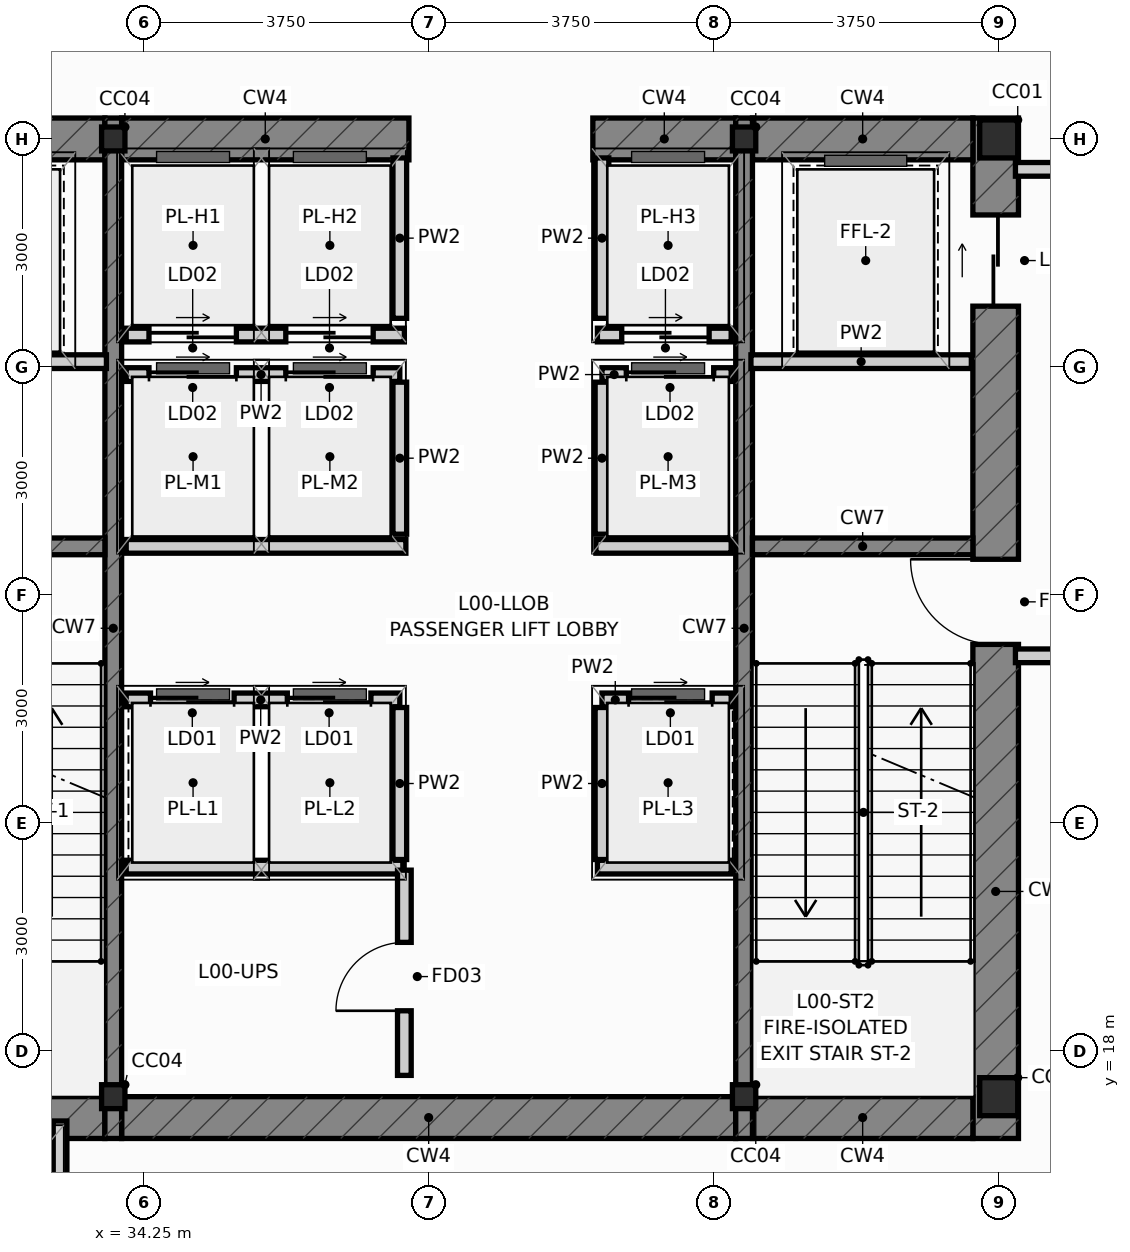
"""IFC4 building model, lengths in metres.
Left out: names, types, materials, properties, quantities, classifications, styles, units other than length and angle.
Written with IfcOpenShell. Run it as: python <this file> out.ifc"""

import sys

from ifc_helpers import new_model, si_unit, direction, frame, frame_2d, origin, origin_2d, place, context, subcontext, project, spatial, rectangle, i_section, extrude, source, transform, mapped, element, fill, save


model = new_model("IFC4")
c1 = context("Model", 3, precision=1e-05, world=origin(), true_north=direction((0.0, 1.0)))
c2 = subcontext(c1, "Body", "Model", "MODEL_VIEW")
j1 = project(units=[si_unit("LENGTHUNIT", "METRE"), si_unit("PLANEANGLEUNIT", "RADIAN")], contexts=[c1])
p1 = place(None, origin())
s1 = spatial("IfcSite", under=j1, at=p1, CompositionType="ELEMENT")
p2 = place(p1, origin())
s2 = spatial("IfcBuilding", under=s1, at=p2, CompositionType="ELEMENT")
p3 = place(p2, origin())
s3 = spatial("IfcBuildingStorey", under=s2, at=p3, CompositionType="ELEMENT", Elevation=0.0)
m1 = source(origin(), c2, "Body", "SweptSolid", [
    extrude(i_section(OverallWidth=0.5, OverallDepth=0.5, WebThickness=0.028, FlangeThickness=0.04, at=origin_2d()), origin(), (0.0, 0.0, 1.0), 5.4),
])
for number, where, z_axis, x_axis in (
    (1, (45.5, 17.4, 0.0), (0.0, 0.0, 1.0), (1.0, 0.0, 0.0)),
    (2, (45.5, 30.0, 0.0), (0.0, 0.0, 1.0), (1.0, 0.0, 0.0)),
):
    element("IfcColumn", number, at=place(p3, frame(where, z_axis=z_axis, x_axis=x_axis)), inside=s3, PredefinedType="COLUMN", context=c2, shape_type="MappedRepresentation", body=[
        mapped(m1, transform((0.0, 0.0, 0.0), scale=1.0)),
    ])
m2 = source(origin(), c2, "Body", "SweptSolid", [
    extrude(i_section(OverallWidth=0.307, OverallDepth=0.315, WebThickness=0.012, FlangeThickness=0.019, at=origin_2d()), origin(), (0.0, 0.0, 1.0), 5.4),
])
for number, where, z_axis, x_axis in (
    (3, (33.85, 17.4, 0.0), (0.0, 0.0, 1.0), (1.0, 0.0, 0.0)),
    (4, (42.15, 17.4, 0.0), (0.0, 0.0, 1.0), (1.0, 0.0, 0.0)),
    (5, (33.85, 30.0, 0.0), (0.0, 0.0, 1.0), (1.0, 0.0, 0.0)),
    (6, (42.15, 30.0, 0.0), (0.0, 0.0, 1.0), (1.0, 0.0, 0.0)),
):
    element("IfcColumn", number, at=place(p3, frame(where, z_axis=z_axis, x_axis=x_axis)), inside=s3, PredefinedType="COLUMN", context=c2, shape_type="MappedRepresentation", body=[
        mapped(m2, transform((0.0, 0.0, 0.0), scale=1.0)),
    ])
p4 = place(p3, frame((45.46, 16.85, 0.0), z_axis=(0.0, 0.0, 1.0), x_axis=(0.0, 1.0, 0.0)))
e7 = element("IfcWall", 7, at=p4, inside=s3, PredefinedType="SHEAR", context=c2, shape_type="SweptSolid", body=[
    extrude(rectangle(XDim=13.425, YDim=0.6, at=frame_2d((6.712, 0.0))), origin(), (0.0, 0.0, 1.0), 5.4),
])
p5 = place(p4, frame((6.5, 0.0, 0.0)))
e8 = element("IfcOpeningElement", 8, at=p5, cuts=e7, PredefinedType="OPENING", context=c2, shape_type="SweptSolid", body=[
    extrude(rectangle(XDim=1.12, YDim=2.15, at=frame_2d((0.56, 1.075))), frame((0.0, 0.312, 0.0), z_axis=(0.0, -1.0, 0.0), x_axis=(1.0, 0.0, 0.0)), (0.0, 0.0, 1.0), 0.624),
])
p6 = place(p4, frame((10.95, 0.0, 0.0)))
e9 = element("IfcOpeningElement", 9, at=p6, cuts=e7, PredefinedType="OPENING", context=c2, shape_type="SweptSolid", body=[
    extrude(rectangle(XDim=1.2, YDim=2.2, at=frame_2d((0.6, 1.1))), frame((0.0, 0.312, 0.0), z_axis=(0.0, -1.0, 0.0), x_axis=(1.0, 0.0, 0.0)), (0.0, 0.0, 1.0), 0.624),
])
p7 = place(p3, frame((30.84, 17.125, 0.0), z_axis=(0.0, 0.0, 1.0), x_axis=(1.0, 0.0, 0.0)))
e10 = element("IfcWall", 10, at=p7, inside=s3, PredefinedType="SHEAR", context=c2, shape_type="SweptSolid", body=[
    extrude(rectangle(XDim=2.9, YDim=0.55, at=frame_2d((1.45, 0.0))), origin(), (0.0, 0.0, 1.0), 5.4),
])
p8 = place(p3, frame((33.96, 17.125, 0.0), z_axis=(0.0, 0.0, 1.0), x_axis=(1.0, 0.0, 0.0)))
e11 = element("IfcWall", 11, at=p8, inside=s3, PredefinedType="SHEAR", context=c2, shape_type="SweptSolid", body=[
    extrude(rectangle(XDim=8.08, YDim=0.55, at=frame_2d((4.04, 0.0))), origin(), (0.0, 0.0, 1.0), 5.4),
])
for number, where, z_axis, x_axis in (
    (12, (42.26, 17.125, 0.0), (0.0, 0.0, 1.0), (1.0, 0.0, 0.0)),
    (13, (30.84, 30.0, 0.0), (0.0, 0.0, 1.0), (1.0, 0.0, 0.0)),
):
    element("IfcWall", number, at=place(p3, frame(where, z_axis=z_axis, x_axis=x_axis)), inside=s3, PredefinedType="SHEAR", context=c2, shape_type="SweptSolid", body=[
        extrude(rectangle(XDim=2.9, YDim=0.55, at=frame_2d((1.45, 0.0))), origin(), (0.0, 0.0, 1.0), 5.4),
    ])
p9 = place(p3, frame((33.96, 30.0, 0.0), z_axis=(0.0, 0.0, 1.0), x_axis=(1.0, 0.0, 0.0)))
e14 = element("IfcWall", 14, at=p9, inside=s3, PredefinedType="SHEAR", context=c2, shape_type="SweptSolid", body=[
    extrude(rectangle(XDim=3.78, YDim=0.55, at=frame_2d((1.89, 0.0))), origin(), (0.0, 0.0, 1.0), 5.4),
])
p10 = place(p3, frame((40.16, 30.0, 0.0), z_axis=(0.0, 0.0, 1.0), x_axis=(1.0, 0.0, 0.0)))
e15 = element("IfcWall", 15, at=p10, inside=s3, PredefinedType="SHEAR", context=c2, shape_type="SweptSolid", body=[
    extrude(rectangle(XDim=1.88, YDim=0.55, at=frame_2d((0.94, 0.0))), origin(), (0.0, 0.0, 1.0), 5.4),
])
p11 = place(p3, frame((42.26, 30.0, 0.0), z_axis=(0.0, 0.0, 1.0), x_axis=(1.0, 0.0, 0.0)))
e16 = element("IfcWall", 16, at=p11, inside=s3, PredefinedType="SHEAR", context=c2, shape_type="SweptSolid", body=[
    extrude(rectangle(XDim=2.9, YDim=0.55, at=frame_2d((1.45, 0.0))), origin(), (0.0, 0.0, 1.0), 5.4),
])
for number, where, z_axis, x_axis in (
    (17, (33.85, 16.85, 0.0), (0.0, 0.0, 1.0), (0.0, 1.0, 0.0)),
    (18, (42.15, 16.85, 0.0), (0.0, 0.0, 1.0), (0.0, 1.0, 0.0)),
):
    element("IfcWall", number, at=place(p3, frame(where, z_axis=z_axis, x_axis=x_axis)), inside=s3, PredefinedType="SHEAR", context=c2, shape_type="SweptSolid", body=[
        extrude(rectangle(XDim=13.425, YDim=0.22, at=frame_2d((6.712, 0.0))), origin(), (0.0, 0.0, 1.0), 5.4),
    ])
for number, where, z_axis, x_axis in (
    (19, (30.84, 24.64, 0.0), (0.0, 0.0, 1.0), (1.0, 0.0, 0.0)),
    (20, (42.26, 24.64, 0.0), (0.0, 0.0, 1.0), (1.0, 0.0, 0.0)),
):
    element("IfcWall", number, at=place(p3, frame(where, z_axis=z_axis, x_axis=x_axis)), inside=s3, PredefinedType="SHEAR", context=c2, shape_type="SweptSolid", body=[
        extrude(rectangle(XDim=2.9, YDim=0.22, at=frame_2d((1.45, 0.0))), origin(), (0.0, 0.0, 1.0), 5.4),
    ])
p12 = place(p3, frame((33.15, 14.42, 0.0), z_axis=(0.0, 0.0, 1.0), x_axis=(0.0, 1.0, 0.0)))
e21 = element("IfcWall", 21, at=p12, inside=s3, PredefinedType="PARTITIONING", context=c2, shape_type="SweptSolid", body=[
    extrude(rectangle(XDim=2.66, YDim=0.18, at=frame_2d((1.33, 0.0))), origin(), (0.0, 0.0, 1.0), 5.08),
])
p13 = place(p3, frame((34.02, 22.62, 0.0), z_axis=(0.0, 0.0, 1.0), x_axis=(1.0, 0.0, 0.0)))
e22 = element("IfcWall", 22, at=p13, inside=s3, PredefinedType="PARTITIONING", context=c2, shape_type="SweptSolid", body=[
    extrude(rectangle(XDim=3.6, YDim=0.18, at=frame_2d((1.8, 0.0))), origin(), (0.0, 0.0, 1.0), 5.08),
])
p14 = place(p13, frame((0.32, 0.0, 0.0)))
e23 = element("IfcOpeningElement", 23, at=p14, cuts=e22, PredefinedType="OPENING", context=c2, shape_type="SweptSolid", body=[
    extrude(rectangle(XDim=1.1, YDim=2.2, at=frame_2d((0.55, 1.1))), frame((0.0, 0.102, 0.0), z_axis=(0.0, -1.0, 0.0), x_axis=(1.0, 0.0, 0.0)), (0.0, 0.0, 1.0), 0.204),
])
p15 = place(p13, frame((2.12, 0.0, 0.0)))
e24 = element("IfcOpeningElement", 24, at=p15, cuts=e22, PredefinedType="OPENING", context=c2, shape_type="SweptSolid", body=[
    extrude(rectangle(XDim=1.1, YDim=2.2, at=frame_2d((0.55, 1.1))), frame((0.0, 0.102, 0.0), z_axis=(0.0, -1.0, 0.0), x_axis=(1.0, 0.0, 0.0)), (0.0, 0.0, 1.0), 0.204),
])
p16 = place(p3, frame((40.28, 22.62, 0.0), z_axis=(0.0, 0.0, 1.0), x_axis=(1.0, 0.0, 0.0)))
e25 = element("IfcWall", 25, at=p16, inside=s3, PredefinedType="PARTITIONING", context=c2, shape_type="SweptSolid", body=[
    extrude(rectangle(XDim=1.7, YDim=0.18, at=frame_2d((0.85, 0.0))), origin(), (0.0, 0.0, 1.0), 5.08),
])
p17 = place(p16, frame((0.35, 0.0, 0.0)))
e26 = element("IfcOpeningElement", 26, at=p17, cuts=e25, PredefinedType="OPENING", context=c2, shape_type="SweptSolid", body=[
    extrude(rectangle(XDim=1.1, YDim=2.2, at=frame_2d((0.55, 1.1))), frame((0.0, 0.102, 0.0), z_axis=(0.0, -1.0, 0.0), x_axis=(1.0, 0.0, 0.0)), (0.0, 0.0, 1.0), 0.204),
])
for number, where, z_axis, x_axis in (
    (27, (37.62, 20.52, 0.0), (0.0, 0.0, 1.0), (0.0, 1.0, 0.0)),
    (28, (40.28, 20.52, 0.0), (0.0, 0.0, 1.0), (0.0, 1.0, 0.0)),
):
    element("IfcWall", number, at=place(p3, frame(where, z_axis=z_axis, x_axis=x_axis)), inside=s3, PredefinedType="PARTITIONING", context=c2, shape_type="SweptSolid", body=[
        extrude(rectangle(XDim=2.0, YDim=0.18, at=frame_2d((1.0, 0.0))), origin(), (0.0, 0.0, 1.0), 5.08),
    ])
p18 = place(p3, frame((34.02, 26.9, 0.0), z_axis=(0.0, 0.0, 1.0), x_axis=(1.0, 0.0, 0.0)))
e29 = element("IfcWall", 29, at=p18, inside=s3, PredefinedType="PARTITIONING", context=c2, shape_type="SweptSolid", body=[
    extrude(rectangle(XDim=3.6, YDim=0.18, at=frame_2d((1.8, 0.0))), origin(), (0.0, 0.0, 1.0), 5.08),
])
p19 = place(p18, frame((0.3, 0.0, 0.0)))
e30 = element("IfcOpeningElement", 30, at=p19, cuts=e29, PredefinedType="OPENING", context=c2, shape_type="SweptSolid", body=[
    extrude(rectangle(XDim=1.15, YDim=2.2, at=frame_2d((0.575, 1.1))), frame((0.0, 0.102, 0.0), z_axis=(0.0, -1.0, 0.0), x_axis=(1.0, 0.0, 0.0)), (0.0, 0.0, 1.0), 0.204),
])
p20 = place(p18, frame((2.1, 0.0, 0.0)))
e31 = element("IfcOpeningElement", 31, at=p20, cuts=e29, PredefinedType="OPENING", context=c2, shape_type="SweptSolid", body=[
    extrude(rectangle(XDim=1.15, YDim=2.2, at=frame_2d((0.575, 1.1))), frame((0.0, 0.102, 0.0), z_axis=(0.0, -1.0, 0.0), x_axis=(1.0, 0.0, 0.0)), (0.0, 0.0, 1.0), 0.204),
])
p21 = place(p3, frame((40.28, 26.9, 0.0), z_axis=(0.0, 0.0, 1.0), x_axis=(1.0, 0.0, 0.0)))
e32 = element("IfcWall", 32, at=p21, inside=s3, PredefinedType="PARTITIONING", context=c2, shape_type="SweptSolid", body=[
    extrude(rectangle(XDim=1.7, YDim=0.18, at=frame_2d((0.85, 0.0))), origin(), (0.0, 0.0, 1.0), 5.08),
])
p22 = place(p21, frame((0.32, 0.0, 0.0)))
e33 = element("IfcOpeningElement", 33, at=p22, cuts=e32, PredefinedType="OPENING", context=c2, shape_type="SweptSolid", body=[
    extrude(rectangle(XDim=1.15, YDim=2.2, at=frame_2d((0.575, 1.1))), frame((0.0, 0.102, 0.0), z_axis=(0.0, -1.0, 0.0), x_axis=(1.0, 0.0, 0.0)), (0.0, 0.0, 1.0), 0.204),
])
for number, where, z_axis, x_axis in (
    (34, (37.62, 24.8, 0.0), (0.0, 0.0, 1.0), (0.0, 1.0, 0.0)),
    (35, (40.28, 24.8, 0.0), (0.0, 0.0, 1.0), (0.0, 1.0, 0.0)),
):
    element("IfcWall", number, at=place(p3, frame(where, z_axis=z_axis, x_axis=x_axis)), inside=s3, PredefinedType="PARTITIONING", context=c2, shape_type="SweptSolid", body=[
        extrude(rectangle(XDim=2.0, YDim=0.18, at=frame_2d((1.0, 0.0))), origin(), (0.0, 0.0, 1.0), 5.08),
    ])
p23 = place(p3, frame((34.02, 24.64, 0.0), z_axis=(0.0, 0.0, 1.0), x_axis=(1.0, 0.0, 0.0)))
e36 = element("IfcWall", 36, at=p23, inside=s3, PredefinedType="PARTITIONING", context=c2, shape_type="SweptSolid", body=[
    extrude(rectangle(XDim=3.68, YDim=0.18, at=frame_2d((1.84, 0.0))), origin(), (0.0, 0.0, 1.0), 5.08),
])
p24 = place(p3, frame((40.2, 24.64, 0.0), z_axis=(0.0, 0.0, 1.0), x_axis=(1.0, 0.0, 0.0)))
e37 = element("IfcWall", 37, at=p24, inside=s3, PredefinedType="PARTITIONING", context=c2, shape_type="SweptSolid", body=[
    extrude(rectangle(XDim=1.78, YDim=0.18, at=frame_2d((0.89, 0.0))), origin(), (0.0, 0.0, 1.0), 5.08),
])
p25 = place(p3, frame((34.02, 27.42, 0.0), z_axis=(0.0, 0.0, 1.0), x_axis=(1.0, 0.0, 0.0)))
e38 = element("IfcWall", 38, at=p25, inside=s3, PredefinedType="PARTITIONING", context=c2, shape_type="SweptSolid", body=[
    extrude(rectangle(XDim=3.66, YDim=0.18, at=frame_2d((1.83, 0.0))), origin(), (0.0, 0.0, 1.0), 5.08),
])
p26 = place(p25, frame((0.3, 0.0, 0.0)))
e39 = element("IfcOpeningElement", 39, at=p26, cuts=e38, PredefinedType="OPENING", context=c2, shape_type="SweptSolid", body=[
    extrude(rectangle(XDim=1.15, YDim=2.2, at=frame_2d((0.575, 1.1))), frame((0.0, 0.102, 0.0), z_axis=(0.0, -1.0, 0.0), x_axis=(1.0, 0.0, 0.0)), (0.0, 0.0, 1.0), 0.204),
])
p27 = place(p25, frame((2.1, 0.0, 0.0)))
e40 = element("IfcOpeningElement", 40, at=p27, cuts=e38, PredefinedType="OPENING", context=c2, shape_type="SweptSolid", body=[
    extrude(rectangle(XDim=1.15, YDim=2.2, at=frame_2d((0.575, 1.1))), frame((0.0, 0.102, 0.0), z_axis=(0.0, -1.0, 0.0), x_axis=(1.0, 0.0, 0.0)), (0.0, 0.0, 1.0), 0.204),
])
p28 = place(p3, frame((40.22, 27.42, 0.0), z_axis=(0.0, 0.0, 1.0), x_axis=(1.0, 0.0, 0.0)))
e41 = element("IfcWall", 41, at=p28, inside=s3, PredefinedType="PARTITIONING", context=c2, shape_type="SweptSolid", body=[
    extrude(rectangle(XDim=1.76, YDim=0.18, at=frame_2d((0.88, 0.0))), origin(), (0.0, 0.0, 1.0), 5.08),
])
p29 = place(p28, frame((0.32, 0.0, 0.0)))
e42 = element("IfcOpeningElement", 42, at=p29, cuts=e41, PredefinedType="OPENING", context=c2, shape_type="SweptSolid", body=[
    extrude(rectangle(XDim=1.15, YDim=2.2, at=frame_2d((0.575, 1.1))), frame((0.0, 0.102, 0.0), z_axis=(0.0, -1.0, 0.0), x_axis=(1.0, 0.0, 0.0)), (0.0, 0.0, 1.0), 0.204),
])
for number, where, z_axis, x_axis in (
    (43, (37.62, 27.64, 0.0), (0.0, 0.0, 1.0), (0.0, 1.0, 0.0)),
    (44, (40.28, 27.64, 0.0), (0.0, 0.0, 1.0), (0.0, 1.0, 0.0)),
):
    element("IfcWall", number, at=place(p3, frame(where, z_axis=z_axis, x_axis=x_axis)), inside=s3, PredefinedType="PARTITIONING", context=c2, shape_type="SweptSolid", body=[
        extrude(rectangle(XDim=2.11, YDim=0.18, at=frame_2d((1.055, 0.0))), origin(), (0.0, 0.0, 1.0), 5.08),
    ])
p30 = place(p3, frame((45.72, 23.2, 0.0), z_axis=(0.0, 0.0, 1.0), x_axis=(1.0, 0.0, 0.0)))
e45 = element("IfcWall", 45, at=p30, inside=s3, PredefinedType="PARTITIONING", context=c2, shape_type="SweptSolid", body=[
    extrude(rectangle(XDim=2.76, YDim=0.18, at=frame_2d((1.38, 0.0))), origin(), (0.0, 0.0, 1.0), 5.08),
])
p31 = place(p3, frame((45.72, 29.6, 0.0), z_axis=(0.0, 0.0, 1.0), x_axis=(1.0, 0.0, 0.0)))
e46 = element("IfcWall", 46, at=p31, inside=s3, PredefinedType="PARTITIONING", context=c2, shape_type="SweptSolid", body=[
    extrude(rectangle(XDim=2.76, YDim=0.18, at=frame_2d((1.38, 0.0))), origin(), (0.0, 0.0, 1.0), 4.453),
])
for number, where, z_axis, x_axis in (
    (47, (30.86, 27.07, 0.0), (0.0, 0.0, 1.0), (1.0, 0.0, 0.0)),
    (48, (42.24, 27.07, 0.0), (0.0, 0.0, 1.0), (1.0, 0.0, 0.0)),
):
    element("IfcWall", number, at=place(p3, frame(where, z_axis=z_axis, x_axis=x_axis)), inside=s3, PredefinedType="PARTITIONING", context=c2, shape_type="SweptSolid", body=[
        extrude(rectangle(XDim=2.9, YDim=0.18, at=frame_2d((1.45, 0.0))), origin(), (0.0, 0.0, 1.0), 5.08),
    ])
p32 = place(p3, frame((34.02, 20.42, 0.0), z_axis=(0.0, 0.0, 1.0), x_axis=(1.0, 0.0, 0.0)))
e49 = element("IfcWall", 49, at=p32, inside=s3, PredefinedType="PARTITIONING", context=c2, shape_type="SweptSolid", body=[
    extrude(rectangle(XDim=3.64, YDim=0.18, at=frame_2d((1.82, 0.0))), origin(), (0.0, 0.0, 1.0), 5.08),
])
p33 = place(p3, frame((40.22, 20.42, 0.0), z_axis=(0.0, 0.0, 1.0), x_axis=(1.0, 0.0, 0.0)))
e50 = element("IfcWall", 50, at=p33, inside=s3, PredefinedType="PARTITIONING", context=c2, shape_type="SweptSolid", body=[
    extrude(rectangle(XDim=1.76, YDim=0.18, at=frame_2d((0.88, 0.0))), origin(), (0.0, 0.0, 1.0), 5.08),
])
p34 = place(p3, frame((37.68, 17.68, 0.0), z_axis=(0.0, 0.0, 1.0), x_axis=(0.0, 1.0, 0.0)))
e51 = element("IfcWall", 51, at=p34, inside=s3, PredefinedType="PARTITIONING", context=c2, shape_type="SweptSolid", body=[
    extrude(rectangle(XDim=2.7, YDim=0.18, at=frame_2d((1.35, 0.0))), origin(), (0.0, 0.0, 1.0), 5.08),
])
p35 = place(p34, frame((0.85, 0.0, 0.0)))
e52 = element("IfcOpeningElement", 52, at=p35, cuts=e51, PredefinedType="OPENING", context=c2, shape_type="SweptSolid", body=[
    extrude(rectangle(XDim=0.9, YDim=2.1, at=frame_2d((0.45, 1.05))), frame((0.0, 0.102, 0.0), z_axis=(0.0, -1.0, 0.0), x_axis=(1.0, 0.0, 0.0)), (0.0, 0.0, 1.0), 0.204),
])
p36 = place(p5, origin())
e53 = element("IfcDoor", 53, at=p36, inside=s3, OperationType="SINGLE_SWING_RIGHT", PredefinedType="DOOR", context=c2, shape_type="SweptSolid", body=[
    extrude(rectangle(XDim=1.12, YDim=2.15, at=frame_2d((0.56, 1.075))), frame((0.0, 0.025, 0.0), z_axis=(0.0, -1.0, 0.0), x_axis=(1.0, 0.0, 0.0)), (0.0, 0.0, 1.0), 0.05),
])
fill(e8, e53)
p37 = place(p6, origin())
e54 = element("IfcDoor", 54, at=p37, inside=s3, OperationType="SLIDING_TO_RIGHT", PredefinedType="DOOR", context=c2, shape_type="SweptSolid", body=[
    extrude(rectangle(XDim=1.2, YDim=2.2, at=frame_2d((0.6, 1.1))), frame((0.0, 0.025, 0.0), z_axis=(0.0, -1.0, 0.0), x_axis=(1.0, 0.0, 0.0)), (0.0, 0.0, 1.0), 0.05),
])
fill(e9, e54)
p38 = place(p14, origin())
e55 = element("IfcDoor", 55, at=p38, inside=s3, OperationType="SLIDING_TO_LEFT", PredefinedType="DOOR", context=c2, shape_type="SweptSolid", body=[
    extrude(rectangle(XDim=1.1, YDim=2.2, at=frame_2d((0.55, 1.1))), frame((0.0, 0.025, 0.0), z_axis=(0.0, -1.0, 0.0), x_axis=(1.0, 0.0, 0.0)), (0.0, 0.0, 1.0), 0.05),
])
fill(e23, e55)
p39 = place(p15, origin())
e56 = element("IfcDoor", 56, at=p39, inside=s3, OperationType="SLIDING_TO_RIGHT", PredefinedType="DOOR", context=c2, shape_type="SweptSolid", body=[
    extrude(rectangle(XDim=1.1, YDim=2.2, at=frame_2d((0.55, 1.1))), frame((0.0, 0.025, 0.0), z_axis=(0.0, -1.0, 0.0), x_axis=(1.0, 0.0, 0.0)), (0.0, 0.0, 1.0), 0.05),
])
fill(e24, e56)
p40 = place(p17, origin())
e57 = element("IfcDoor", 57, at=p40, inside=s3, OperationType="SLIDING_TO_LEFT", PredefinedType="DOOR", context=c2, shape_type="SweptSolid", body=[
    extrude(rectangle(XDim=1.1, YDim=2.2, at=frame_2d((0.55, 1.1))), frame((0.0, 0.025, 0.0), z_axis=(0.0, -1.0, 0.0), x_axis=(1.0, 0.0, 0.0)), (0.0, 0.0, 1.0), 0.05),
])
fill(e26, e57)
p41 = place(p19, origin())
e58 = element("IfcDoor", 58, at=p41, inside=s3, OperationType="SLIDING_TO_LEFT", PredefinedType="DOOR", context=c2, shape_type="SweptSolid", body=[
    extrude(rectangle(XDim=1.15, YDim=2.2, at=frame_2d((0.575, 1.1))), frame((0.0, 0.025, 0.0), z_axis=(0.0, -1.0, 0.0), x_axis=(1.0, 0.0, 0.0)), (0.0, 0.0, 1.0), 0.05),
])
fill(e30, e58)
p42 = place(p20, origin())
e59 = element("IfcDoor", 59, at=p42, inside=s3, OperationType="SLIDING_TO_RIGHT", PredefinedType="DOOR", context=c2, shape_type="SweptSolid", body=[
    extrude(rectangle(XDim=1.15, YDim=2.2, at=frame_2d((0.575, 1.1))), frame((0.0, 0.025, 0.0), z_axis=(0.0, -1.0, 0.0), x_axis=(1.0, 0.0, 0.0)), (0.0, 0.0, 1.0), 0.05),
])
fill(e31, e59)
p43 = place(p22, origin())
e60 = element("IfcDoor", 60, at=p43, inside=s3, OperationType="SLIDING_TO_LEFT", PredefinedType="DOOR", context=c2, shape_type="SweptSolid", body=[
    extrude(rectangle(XDim=1.15, YDim=2.2, at=frame_2d((0.575, 1.1))), frame((0.0, 0.025, 0.0), z_axis=(0.0, -1.0, 0.0), x_axis=(1.0, 0.0, 0.0)), (0.0, 0.0, 1.0), 0.05),
])
fill(e33, e60)
p44 = place(p26, origin())
e61 = element("IfcDoor", 61, at=p44, inside=s3, OperationType="SLIDING_TO_RIGHT", PredefinedType="DOOR", context=c2, shape_type="SweptSolid", body=[
    extrude(rectangle(XDim=1.15, YDim=2.2, at=frame_2d((0.575, 1.1))), frame((0.0, 0.025, 0.0), z_axis=(0.0, -1.0, 0.0), x_axis=(1.0, 0.0, 0.0)), (0.0, 0.0, 1.0), 0.05),
])
fill(e39, e61)
p45 = place(p27, origin())
e62 = element("IfcDoor", 62, at=p45, inside=s3, OperationType="SLIDING_TO_LEFT", PredefinedType="DOOR", context=c2, shape_type="SweptSolid", body=[
    extrude(rectangle(XDim=1.15, YDim=2.2, at=frame_2d((0.575, 1.1))), frame((0.0, 0.025, 0.0), z_axis=(0.0, -1.0, 0.0), x_axis=(1.0, 0.0, 0.0)), (0.0, 0.0, 1.0), 0.05),
])
fill(e40, e62)
p46 = place(p29, origin())
e63 = element("IfcDoor", 63, at=p46, inside=s3, OperationType="SLIDING_TO_RIGHT", PredefinedType="DOOR", context=c2, shape_type="SweptSolid", body=[
    extrude(rectangle(XDim=1.15, YDim=2.2, at=frame_2d((0.575, 1.1))), frame((0.0, 0.025, 0.0), z_axis=(0.0, -1.0, 0.0), x_axis=(1.0, 0.0, 0.0)), (0.0, 0.0, 1.0), 0.05),
])
fill(e42, e63)
p47 = place(p35, origin())
e64 = element("IfcDoor", 64, at=p47, inside=s3, OperationType="SINGLE_SWING_LEFT", PredefinedType="DOOR", context=c2, shape_type="SweptSolid", body=[
    extrude(rectangle(XDim=0.9, YDim=2.1, at=frame_2d((0.45, 1.05))), frame((0.0, 0.025, 0.0), z_axis=(0.0, -1.0, 0.0), x_axis=(1.0, 0.0, 0.0)), (0.0, 0.0, 1.0), 0.05),
])
fill(e52, e64)
save(model, sys.argv[1])
